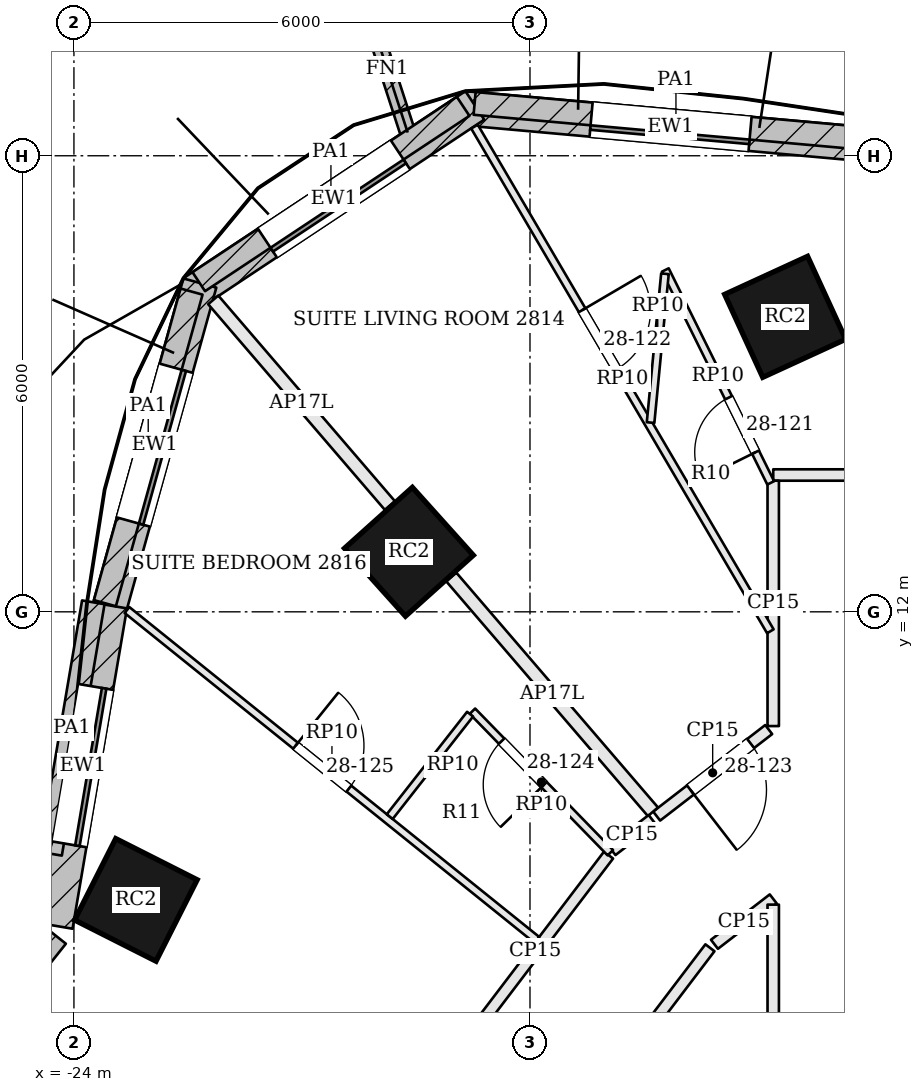
"""IFC4 building model, lengths in metres.
Left out: names, types, materials, properties, quantities, classifications, styles, units other than length and angle.
Written with IfcOpenShell. Run it as: python <this file> out.ifc"""

import sys

from ifc_helpers import new_model, si_unit, direction, frame, frame_2d, origin, origin_2d, place, context, subcontext, project, spatial, rectangle, extrude, element, fill, save


model = new_model("IFC4")
c1 = context("Model", 3, precision=1e-05, world=origin(), true_north=direction((0.0, 1.0)))
c2 = subcontext(c1, "Body", "Model", "MODEL_VIEW")
j1 = project(units=[si_unit("LENGTHUNIT", "METRE"), si_unit("PLANEANGLEUNIT", "RADIAN")], contexts=[c1])
p1 = place(None, origin())
s1 = spatial("IfcSite", under=j1, at=p1, CompositionType="ELEMENT")
p2 = place(p1, origin())
s2 = spatial("IfcBuilding", under=s1, at=p2, CompositionType="ELEMENT")
p3 = place(p2, frame((0.0, 0.0, 117.6)))
s3 = spatial("IfcBuildingStorey", under=s2, at=p3, CompositionType="ELEMENT", Elevation=117.6)
for number, where, z_axis, x_axis in (
    (1, (-14.643, 15.881, 0.0), (0.0, 0.0, 1.0), (-0.909, -0.417, 0.0)),
    (2, (-19.593, 12.79, 0.0), (0.0, 0.0, 1.0), (-0.744, -0.668, 0.0)),
    (3, (-23.185, 8.21, 0.0), (0.0, 0.0, 1.0), (-0.451, -0.893, 0.0)),
):
    element("IfcColumn", number, at=place(p3, frame(where, z_axis=z_axis, x_axis=x_axis)), inside=s3, PredefinedType="COLUMN", context=c2, shape_type="SweptSolid", body=[
        extrude(rectangle(XDim=1.2, YDim=1.2, at=origin_2d()), origin(), (0.0, 0.0, 1.0), 2.8),
    ])
p4 = place(p3, frame((-13.436, 18.138, 0.0), z_axis=(0.0, 0.0, 1.0), x_axis=(-0.99598810213, 0.089485755376, 0.0)))
e4 = element("IfcWall", 4, at=p4, inside=s3, PredefinedType="SOLIDWALL", context=c2, shape_type="SweptSolid", body=[
    extrude(rectangle(XDim=5.451, YDim=0.45, at=frame_2d((2.726, 0.0))), origin(), (0.0, 0.0, 1.0), 3.3),
])
p5 = place(p4, frame((1.676, 0.0, 0.9)))
e5 = element("IfcOpeningElement", 5, at=p5, cuts=e4, PredefinedType="OPENING", context=c2, shape_type="SweptSolid", body=[
    extrude(rectangle(XDim=2.1, YDim=1.8, at=frame_2d((1.05, 0.9))), frame((0.0, 0.235, 0.0), z_axis=(0.0, -1.0, 0.0), x_axis=(1.0, 0.0, 0.0)), (0.0, 0.0, 1.0), 0.47),
])
p6 = place(p3, frame((-18.726, 18.663, 0.0), z_axis=(0.0, 0.0, 1.0), x_axis=(-0.83333921474, -0.552761931736, 0.0)))
e6 = element("IfcWall", 6, at=p6, inside=s3, PredefinedType="SOLIDWALL", context=c2, shape_type="SweptSolid", body=[
    extrude(rectangle(XDim=4.451, YDim=0.45, at=frame_2d((2.225, 0.0))), origin(), (0.0, 0.0, 1.0), 3.3),
])
p7 = place(p6, frame((1.175, 0.0, 0.9)))
e7 = element("IfcOpeningElement", 7, at=p7, cuts=e6, PredefinedType="OPENING", context=c2, shape_type="SweptSolid", body=[
    extrude(rectangle(XDim=2.1, YDim=1.8, at=frame_2d((1.05, 0.9))), frame((0.0, 0.235, 0.0), z_axis=(0.0, -1.0, 0.0), x_axis=(1.0, 0.0, 0.0)), (0.0, 0.0, 1.0), 0.47),
])
p8 = place(p3, frame((-22.344, 16.326, 0.0), z_axis=(0.0, 0.0, 1.0), x_axis=(-0.267925456304, -0.963439645159, 0.0)))
e8 = element("IfcWall", 8, at=p8, inside=s3, PredefinedType="SOLIDWALL", context=c2, shape_type="SweptSolid", body=[
    extrude(rectangle(XDim=4.427, YDim=0.45, at=frame_2d((2.213, 0.0))), origin(), (0.0, 0.0, 1.0), 3.3),
])
p9 = place(p8, frame((1.164, 0.0, 0.9)))
e9 = element("IfcOpeningElement", 9, at=p9, cuts=e8, PredefinedType="OPENING", context=c2, shape_type="SweptSolid", body=[
    extrude(rectangle(XDim=2.1, YDim=1.8, at=frame_2d((1.05, 0.9))), frame((0.0, 0.235, 0.0), z_axis=(0.0, -1.0, 0.0), x_axis=(1.0, 0.0, 0.0)), (0.0, 0.0, 1.0), 0.47),
])
p10 = place(p3, frame((-23.524, 12.083, 0.0), z_axis=(0.0, 0.0, 1.0), x_axis=(-0.167445072349, -0.985881406532, 0.0)))
e10 = element("IfcWall", 10, at=p10, inside=s3, PredefinedType="SOLIDWALL", context=c2, shape_type="SweptSolid", body=[
    extrude(rectangle(XDim=4.275, YDim=0.45, at=frame_2d((2.137, 0.0))), origin(), (0.0, 0.0, 1.0), 3.3),
])
p11 = place(p10, frame((1.087, 0.0, 0.9)))
e11 = element("IfcOpeningElement", 11, at=p11, cuts=e10, PredefinedType="OPENING", context=c2, shape_type="SweptSolid", body=[
    extrude(rectangle(XDim=2.1, YDim=1.8, at=frame_2d((1.05, 0.9))), frame((0.0, 0.235, 0.0), z_axis=(0.0, -1.0, 0.0), x_axis=(1.0, 0.0, 0.0)), (0.0, 0.0, 1.0), 0.47),
])
p12 = place(p3, frame((-24.282, 7.774, 0.0), z_axis=(0.0, 0.0, 1.0), x_axis=(-0.621735490397, -0.783227285008, 0.0)))
e12 = element("IfcWall", 12, at=p12, inside=s3, PredefinedType="SOLIDWALL", context=c2, shape_type="SweptSolid", body=[
    extrude(rectangle(XDim=4.625, YDim=0.45, at=frame_2d((2.312, 0.0))), origin(), (0.0, 0.0, 1.0), 3.3),
])
p13 = place(p12, frame((1.262, 0.0, 0.9)))
e13 = element("IfcOpeningElement", 13, at=p13, cuts=e12, PredefinedType="OPENING", context=c2, shape_type="SweptSolid", body=[
    extrude(rectangle(XDim=2.1, YDim=1.8, at=frame_2d((1.05, 0.9))), frame((0.0, 0.235, 0.0), z_axis=(0.0, -1.0, 0.0), x_axis=(1.0, 0.0, 0.0)), (0.0, 0.0, 1.0), 0.47),
])
p14 = place(p3, frame((-19.609, 18.305, 0.0), z_axis=(0.0, 0.0, 1.0), x_axis=(-0.308600224758, 0.951191832008, 0.0)))
e14 = element("IfcWall", 14, at=p14, inside=s3, PredefinedType="SOLIDWALL", context=c2, shape_type="SweptSolid", body=[
    extrude(rectangle(XDim=1.75, YDim=0.2, at=frame_2d((0.875, 0.0))), origin(), (0.0, 0.0, 1.0), 3.3),
])
p15 = place(p3, frame((-13.431, 18.212, 3.6), z_axis=(0.0, 0.0, 1.0), x_axis=(-0.995986354678, 0.089505202619, 0.0)))
e15 = element("IfcWall", 15, at=p15, inside=s3, PredefinedType="PARAPET", context=c2, shape_type="SweptSolid", body=[
    extrude(rectangle(XDim=5.319, YDim=0.3, at=frame_2d((2.659, 0.0))), origin(), (0.0, 0.0, 1.0), 1.1),
])
p16 = place(p3, frame((-18.88, 18.65, 3.6), z_axis=(0.0, 0.0, 1.0), x_axis=(-0.833379877726, -0.552700623667, 0.0)))
e16 = element("IfcWall", 16, at=p16, inside=s3, PredefinedType="PARAPET", context=c2, shape_type="SweptSolid", body=[
    extrude(rectangle(XDim=4.173, YDim=0.3, at=frame_2d((2.087, 0.0))), origin(), (0.0, 0.0, 1.0), 1.1),
])
p17 = place(p3, frame((-22.452, 16.213, 3.6), z_axis=(0.0, 0.0, 1.0), x_axis=(-0.267993020858, -0.963420853403, 0.0)))
e17 = element("IfcWall", 17, at=p17, inside=s3, PredefinedType="PARAPET", context=c2, shape_type="SweptSolid", body=[
    extrude(rectangle(XDim=4.255, YDim=0.3, at=frame_2d((2.128, 0.0))), origin(), (0.0, 0.0, 1.0), 1.1),
])
p18 = place(p3, frame((-23.745, 12.125, 3.6), z_axis=(0.0, 0.0, 1.0), x_axis=(-0.167466753484, -0.985877723898, 0.0)))
e18 = element("IfcWall", 18, at=p18, inside=s3, PredefinedType="PARAPET", context=c2, shape_type="SweptSolid", body=[
    extrude(rectangle(XDim=3.354, YDim=0.3, at=frame_2d((1.677, 0.0))), origin(), (0.0, 0.0, 1.0), 1.1),
])
p19 = place(p3, frame((-5.749, 13.8, 0.0), z_axis=(0.0, 0.0, 1.0), x_axis=(-1.0, 0.0, 0.0)))
e19 = element("IfcWall", 19, at=p19, inside=s3, PredefinedType="PARTITIONING", context=c2, shape_type="SweptSolid", body=[
    extrude(rectangle(XDim=9.052, YDim=0.15, at=frame_2d((4.526, 0.0))), origin(), (0.0, 0.0, 1.0), 2.684),
])
p20 = place(p3, frame((-14.8, 13.725, 0.0), z_axis=(0.0, 0.0, 1.0), x_axis=(0.0, -1.0, 0.0)))
e20 = element("IfcWall", 20, at=p20, inside=s3, PredefinedType="PARTITIONING", context=c2, shape_type="SweptSolid", body=[
    extrude(rectangle(XDim=3.228, YDim=0.15, at=frame_2d((1.614, 0.0))), origin(), (0.0, 0.0, 1.0), 2.684),
])
p21 = place(p3, frame((-14.86, 10.451, 0.0), z_axis=(0.0, 0.0, 1.0), x_axis=(-0.791521345152, -0.611141522209, 0.0)))
e21 = element("IfcWall", 21, at=p21, inside=s3, PredefinedType="PARTITIONING", context=c2, shape_type="SweptSolid", body=[
    extrude(rectangle(XDim=1.862, YDim=0.15, at=frame_2d((0.931, 0.0))), origin(), (0.0, 0.0, 1.0), 2.684),
])
p22 = place(p21, frame((0.3, 0.0, 0.0)))
e22 = element("IfcOpeningElement", 22, at=p22, cuts=e21, PredefinedType="OPENING", context=c2, shape_type="SweptSolid", body=[
    extrude(rectangle(XDim=1.0, YDim=2.1, at=frame_2d((0.5, 1.05))), frame((0.0, 0.085, 0.0), z_axis=(0.0, -1.0, 0.0), x_axis=(1.0, 0.0, 0.0)), (0.0, 0.0, 1.0), 0.17),
])
p23 = place(p3, frame((-22.167, 16.104, 0.0), z_axis=(0.0, 0.0, 1.0), x_axis=(0.651585854712, -0.758574896724, 0.0)))
e23 = element("IfcWall", 23, at=p23, inside=s3, PredefinedType="PARTITIONING", context=c2, shape_type="SweptSolid", body=[
    extrude(rectangle(XDim=3.567, YDim=0.175, at=frame_2d((1.783, 0.0))), origin(), (0.0, 0.0, 1.0), 2.28),
])
p24 = place(p3, frame((-19.035, 12.458, 0.0), z_axis=(0.0, 0.0, 1.0), x_axis=(0.651615806177, -0.758549168571, 0.0)))
e24 = element("IfcWall", 24, at=p24, inside=s3, PredefinedType="PARTITIONING", context=c2, shape_type="SweptSolid", body=[
    extrude(rectangle(XDim=4.071, YDim=0.175, at=frame_2d((2.035, 0.0))), origin(), (0.0, 0.0, 1.0), 2.28),
])
p25 = place(p3, frame((-16.393, 9.267, 0.0), z_axis=(0.0, 0.0, 1.0), x_axis=(-0.79167103102, -0.610947607118, 0.0)))
e25 = element("IfcWall", 25, at=p25, inside=s3, PredefinedType="PARTITIONING", context=c2, shape_type="SweptSolid", body=[
    extrude(rectangle(XDim=0.667, YDim=0.15, at=frame_2d((0.333, 0.0))), origin(), (0.0, 0.0, 1.0), 2.684),
])
p26 = place(p3, frame((-16.967, 8.8, 0.0), z_axis=(0.0, 0.0, 1.0), x_axis=(-0.604991921991, -0.796231608469, 0.0)))
e26 = element("IfcWall", 26, at=p26, inside=s3, PredefinedType="PARTITIONING", context=c2, shape_type="SweptSolid", body=[
    extrude(rectangle(XDim=3.185, YDim=0.15, at=frame_2d((1.593, 0.0))), origin(), (0.0, 0.0, 1.0), 2.684),
])
p27 = place(p3, frame((-17.233, 5.475, 0.0), z_axis=(0.0, 0.0, 1.0), x_axis=(0.605024750549, 0.796206663639, 0.0)))
e27 = element("IfcWall", 27, at=p27, inside=s3, PredefinedType="PARTITIONING", context=c2, shape_type="SweptSolid", body=[
    extrude(rectangle(XDim=2.645, YDim=0.15, at=frame_2d((1.322, 0.0))), origin(), (0.0, 0.0, 1.0), 2.684),
])
p28 = place(p3, frame((-15.573, 7.626, 0.0), z_axis=(0.0, 0.0, 1.0), x_axis=(0.791581834002, 0.611063171921, 0.0)))
e28 = element("IfcWall", 28, at=p28, inside=s3, PredefinedType="PARTITIONING", context=c2, shape_type="SweptSolid", body=[
    extrude(rectangle(XDim=0.977, YDim=0.15, at=frame_2d((0.488, 0.0))), origin(), (0.0, 0.0, 1.0), 2.684),
])
p29 = place(p3, frame((-14.8, 8.148, 0.0), z_axis=(0.0, 0.0, 1.0), x_axis=(0.0, -1.0, 0.0)))
e29 = element("IfcWall", 29, at=p29, inside=s3, PredefinedType="PARTITIONING", context=c2, shape_type="SweptSolid", body=[
    extrude(rectangle(XDim=12.948, YDim=0.15, at=frame_2d((6.474, 0.0))), origin(), (0.0, 0.0, 1.0), 2.684),
])
p30 = place(p29, frame((5.536, 0.0, 0.0)))
e30 = element("IfcOpeningElement", 30, at=p30, cuts=e29, PredefinedType="OPENING", context=c2, shape_type="SweptSolid", body=[
    extrude(rectangle(XDim=1.8, YDim=2.1, at=frame_2d((0.9, 1.05))), frame((0.0, 0.085, 0.0), z_axis=(0.0, -1.0, 0.0), x_axis=(1.0, 0.0, 0.0)), (0.0, 0.0, 1.0), 0.17),
])
p31 = place(p3, frame((-18.73, 18.384, 0.0), z_axis=(0.0, 0.0, 1.0), x_axis=(0.505731710935, -0.862690811679, 0.0)))
e31 = element("IfcWall", 31, at=p31, inside=s3, PredefinedType="PARTITIONING", context=c2, shape_type="SweptSolid", body=[
    extrude(rectangle(XDim=7.697, YDim=0.1, at=frame_2d((3.848, 0.0))), origin(), (0.0, 0.0, 1.0), 2.684),
])
p32 = place(p31, frame((2.8, 0.0, 0.0)))
e32 = element("IfcOpeningElement", 32, at=p32, cuts=e31, PredefinedType="OPENING", context=c2, shape_type="SweptSolid", body=[
    extrude(rectangle(XDim=0.9, YDim=2.4, at=frame_2d((0.45, 1.2))), frame((0.0, 0.06, 0.0), z_axis=(0.0, -1.0, 0.0), x_axis=(1.0, 0.0, 0.0)), (0.0, 0.0, 1.0), 0.12),
])
p33 = place(p3, frame((-14.833, 13.697, 0.0), z_axis=(0.0, 0.0, 1.0), x_axis=(-0.443678804827, 0.896185872544, 0.0)))
e33 = element("IfcWall", 33, at=p33, inside=s3, PredefinedType="PARTITIONING", context=c2, shape_type="SweptSolid", body=[
    extrude(rectangle(XDim=3.125, YDim=0.1, at=frame_2d((1.562, 0.0))), origin(), (0.0, 0.0, 1.0), 2.684),
])
p34 = place(p33, frame((0.45, 0.0, 0.0)))
e34 = element("IfcOpeningElement", 34, at=p34, cuts=e33, PredefinedType="OPENING", context=c2, shape_type="SweptSolid", body=[
    extrude(rectangle(XDim=0.8, YDim=2.1, at=frame_2d((0.4, 1.05))), frame((0.0, 0.06, 0.0), z_axis=(0.0, -1.0, 0.0), x_axis=(1.0, 0.0, 0.0)), (0.0, 0.0, 1.0), 0.12),
])
p35 = place(p3, frame((-16.225, 16.447, 0.0), z_axis=(0.0, 0.0, 1.0), x_axis=(-0.096086146031, -0.995373021807, 0.0)))
e35 = element("IfcWall", 35, at=p35, inside=s3, PredefinedType="PARTITIONING", context=c2, shape_type="SweptSolid", body=[
    extrude(rectangle(XDim=1.967, YDim=0.1, at=frame_2d((0.983, 0.0))), origin(), (0.0, 0.0, 1.0), 2.684),
])
p36 = place(p3, frame((-23.302, 12.023, 0.0), z_axis=(0.0, 0.0, 1.0), x_axis=(0.779059160474, -0.626950416286, 0.0)))
e36 = element("IfcWall", 36, at=p36, inside=s3, PredefinedType="PARTITIONING", context=c2, shape_type="SweptSolid", body=[
    extrude(rectangle(XDim=6.923, YDim=0.1, at=frame_2d((3.461, 0.0))), origin(), (0.0, 0.0, 1.0), 2.684),
])
p37 = place(p36, frame((2.847, 0.0, 0.0)))
e37 = element("IfcOpeningElement", 37, at=p37, cuts=e36, PredefinedType="OPENING", context=c2, shape_type="SweptSolid", body=[
    extrude(rectangle(XDim=0.9, YDim=2.4, at=frame_2d((0.45, 1.2))), frame((0.0, 0.06, 0.0), z_axis=(0.0, -1.0, 0.0), x_axis=(1.0, 0.0, 0.0)), (0.0, 0.0, 1.0), 0.12),
])
p38 = place(p3, frame((-16.943, 8.831, 0.0), z_axis=(0.0, 0.0, 1.0), x_axis=(-0.697749856207, 0.716341495492, 0.0)))
e38 = element("IfcWall", 38, at=p38, inside=s3, PredefinedType="PARTITIONING", context=c2, shape_type="SweptSolid", body=[
    extrude(rectangle(XDim=2.6, YDim=0.1, at=frame_2d((1.3, 0.0))), origin(), (0.0, 0.0, 1.0), 2.684),
])
p39 = place(p38, frame((1.25, 0.0, 0.0)))
e39 = element("IfcOpeningElement", 39, at=p39, cuts=e38, PredefinedType="OPENING", context=c2, shape_type="SweptSolid", body=[
    extrude(rectangle(XDim=0.8, YDim=2.1, at=frame_2d((0.4, 1.05))), frame((0.0, 0.06, 0.0), z_axis=(0.0, -1.0, 0.0), x_axis=(1.0, 0.0, 0.0)), (0.0, 0.0, 1.0), 0.12),
])
p40 = place(p3, frame((-18.788, 10.654, 0.0), z_axis=(0.0, 0.0, 1.0), x_axis=(-0.617053430204, -0.786921256717, 0.0)))
e40 = element("IfcWall", 40, at=p40, inside=s3, PredefinedType="PARTITIONING", context=c2, shape_type="SweptSolid", body=[
    extrude(rectangle(XDim=1.713, YDim=0.1, at=frame_2d((0.856, 0.0))), origin(), (0.0, 0.0, 1.0), 2.684),
])
p41 = place(p5, origin())
e41 = element("IfcWindow", 41, at=p41, inside=s3, PartitioningType="SINGLE_PANEL", PredefinedType="WINDOW", context=c2, shape_type="SweptSolid", body=[
    extrude(rectangle(XDim=2.1, YDim=1.8, at=frame_2d((1.05, 0.9))), frame((0.0, 0.135, 0.0), z_axis=(0.0, -1.0, 0.0), x_axis=(1.0, 0.0, 0.0)), (0.0, 0.0, 1.0), 0.06),
])
fill(e5, e41)
p42 = place(p7, origin())
e42 = element("IfcWindow", 42, at=p42, inside=s3, PartitioningType="SINGLE_PANEL", PredefinedType="WINDOW", context=c2, shape_type="SweptSolid", body=[
    extrude(rectangle(XDim=2.1, YDim=1.8, at=frame_2d((1.05, 0.9))), frame((0.0, 0.135, 0.0), z_axis=(0.0, -1.0, 0.0), x_axis=(1.0, 0.0, 0.0)), (0.0, 0.0, 1.0), 0.06),
])
fill(e7, e42)
p43 = place(p9, origin())
e43 = element("IfcWindow", 43, at=p43, inside=s3, PartitioningType="SINGLE_PANEL", PredefinedType="WINDOW", context=c2, shape_type="SweptSolid", body=[
    extrude(rectangle(XDim=2.1, YDim=1.8, at=frame_2d((1.05, 0.9))), frame((0.0, 0.135, 0.0), z_axis=(0.0, -1.0, 0.0), x_axis=(1.0, 0.0, 0.0)), (0.0, 0.0, 1.0), 0.06),
])
fill(e9, e43)
p44 = place(p11, origin())
e44 = element("IfcWindow", 44, at=p44, inside=s3, PartitioningType="SINGLE_PANEL", PredefinedType="WINDOW", context=c2, shape_type="SweptSolid", body=[
    extrude(rectangle(XDim=2.1, YDim=1.8, at=frame_2d((1.05, 0.9))), frame((0.0, 0.135, 0.0), z_axis=(0.0, -1.0, 0.0), x_axis=(1.0, 0.0, 0.0)), (0.0, 0.0, 1.0), 0.06),
])
fill(e11, e44)
p45 = place(p34, origin())
e45 = element("IfcDoor", 45, at=p45, inside=s3, OperationType="SINGLE_SWING_LEFT", PredefinedType="DOOR", context=c2, shape_type="SweptSolid", body=[
    extrude(rectangle(XDim=0.8, YDim=2.1, at=frame_2d((0.4, 1.05))), frame((0.0, 0.025, 0.0), z_axis=(0.0, -1.0, 0.0), x_axis=(1.0, 0.0, 0.0)), (0.0, 0.0, 1.0), 0.05),
])
fill(e34, e45)
p46 = place(p32, origin())
e46 = element("IfcDoor", 46, at=p46, inside=s3, OperationType="SINGLE_SWING_LEFT", PredefinedType="DOOR", context=c2, shape_type="SweptSolid", body=[
    extrude(rectangle(XDim=0.9, YDim=2.4, at=frame_2d((0.45, 1.2))), frame((0.0, 0.025, 0.0), z_axis=(0.0, -1.0, 0.0), x_axis=(1.0, 0.0, 0.0)), (0.0, 0.0, 1.0), 0.05),
])
fill(e32, e46)
p47 = place(p22, origin())
e47 = element("IfcDoor", 47, at=p47, inside=s3, OperationType="SINGLE_SWING_RIGHT", PredefinedType="DOOR", context=c2, shape_type="SweptSolid", body=[
    extrude(rectangle(XDim=1.0, YDim=2.1, at=frame_2d((0.5, 1.05))), frame((0.0, 0.025, 0.0), z_axis=(0.0, -1.0, 0.0), x_axis=(1.0, 0.0, 0.0)), (0.0, 0.0, 1.0), 0.05),
])
fill(e22, e47)
p48 = place(p39, origin())
e48 = element("IfcDoor", 48, at=p48, inside=s3, OperationType="SINGLE_SWING_LEFT", PredefinedType="DOOR", context=c2, shape_type="SweptSolid", body=[
    extrude(rectangle(XDim=0.8, YDim=2.1, at=frame_2d((0.4, 1.05))), frame((0.0, 0.025, 0.0), z_axis=(0.0, -1.0, 0.0), x_axis=(1.0, 0.0, 0.0)), (0.0, 0.0, 1.0), 0.05),
])
fill(e39, e48)
p49 = place(p37, origin())
e49 = element("IfcDoor", 49, at=p49, inside=s3, OperationType="SINGLE_SWING_LEFT", PredefinedType="DOOR", context=c2, shape_type="SweptSolid", body=[
    extrude(rectangle(XDim=0.9, YDim=2.4, at=frame_2d((0.45, 1.2))), frame((0.0, 0.025, 0.0), z_axis=(0.0, -1.0, 0.0), x_axis=(1.0, 0.0, 0.0)), (0.0, 0.0, 1.0), 0.05),
])
fill(e37, e49)
save(model, sys.argv[1])
